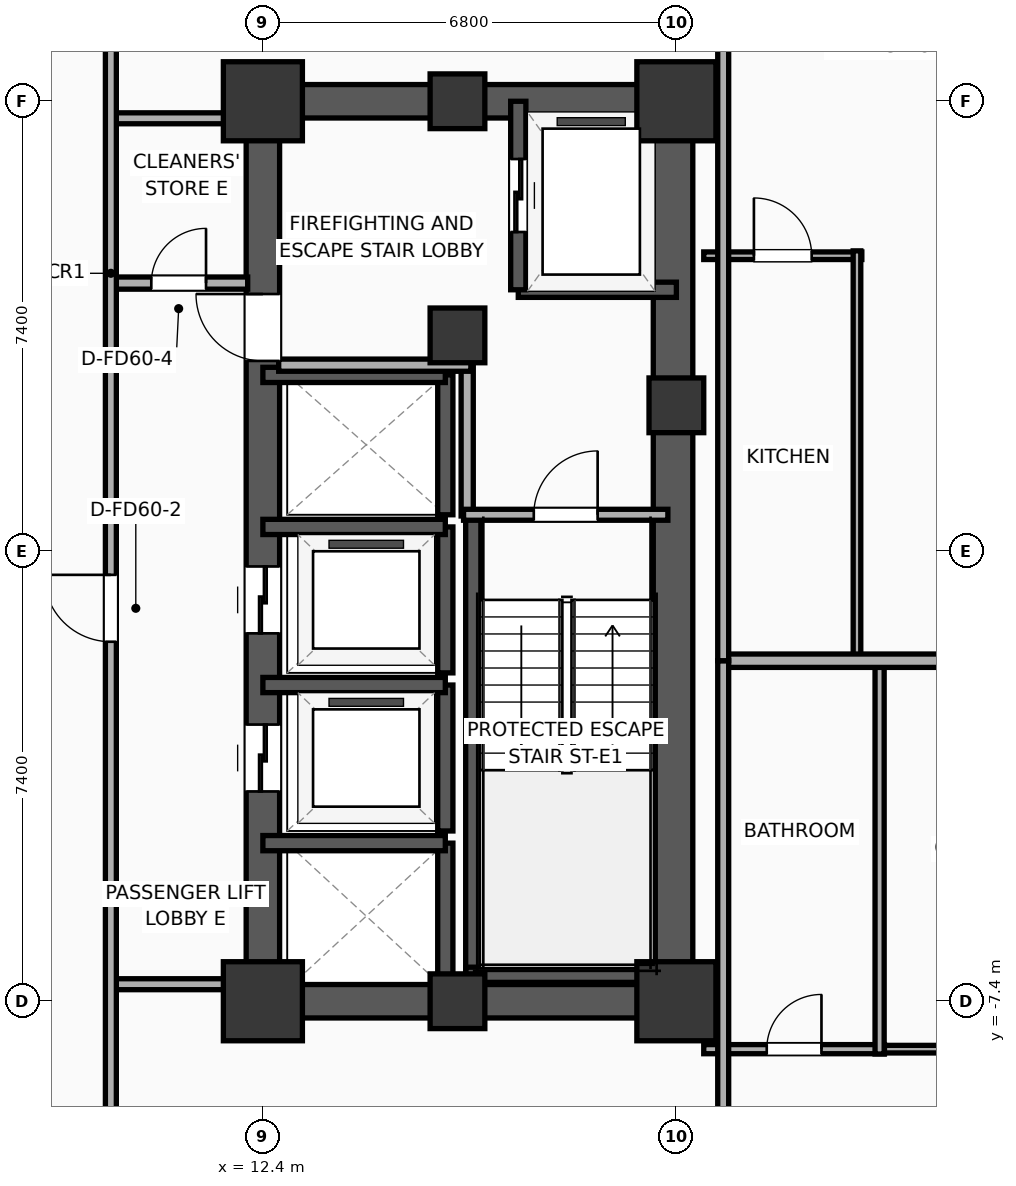
"""IFC4 building model, lengths in metres.
Left out: names, types, materials, properties, quantities, classifications, styles, units other than length and angle.
Written with IfcOpenShell. Run it as: python <this file> out.ifc"""

import sys

from ifc_helpers import new_model, si_unit, direction, frame, frame_2d, origin, origin_2d, place, context, subcontext, project, spatial, rectangle, extrude, element, fill, save


model = new_model("IFC4")
c1 = context("Model", 3, precision=1e-05, world=origin(), true_north=direction((0.0, 1.0)))
c2 = subcontext(c1, "Body", "Model", "MODEL_VIEW")
j1 = project(units=[si_unit("LENGTHUNIT", "METRE"), si_unit("PLANEANGLEUNIT", "RADIAN")], contexts=[c1])
p1 = place(None, origin())
s1 = spatial("IfcSite", under=j1, at=p1, CompositionType="ELEMENT")
p2 = place(p1, origin())
s2 = spatial("IfcBuilding", under=s1, at=p2, CompositionType="ELEMENT")
p3 = place(p2, frame((0.0, 0.0, 140.4)))
s3 = spatial("IfcBuildingStorey", under=s2, at=p3, CompositionType="ELEMENT", Elevation=140.4)
p4 = place(p3, frame((12.4, -7.4, 0.0), z_axis=(0.0, 0.0, 1.0), x_axis=(1.0, 0.0, 0.0)))
e1 = element("IfcColumn", 1, at=p4, inside=s3, PredefinedType="COLUMN", context=c2, shape_type="SweptSolid", body=[
    extrude(rectangle(XDim=1.3, YDim=1.3, at=origin_2d()), origin(), (0.0, 0.0, 1.0), 3.9),
])
p5 = place(p3, frame((15.6, 3.55, 0.0), z_axis=(0.0, 0.0, 1.0), x_axis=(1.0, 0.0, 0.0)))
e2 = element("IfcColumn", 2, at=p5, inside=s3, PredefinedType="COLUMN", context=c2, shape_type="SweptSolid", body=[
    extrude(rectangle(XDim=0.9, YDim=0.9, at=origin_2d()), origin(), (0.0, 0.0, 1.0), 3.9),
])
p6 = place(p3, frame((12.4, 7.4, 0.0), z_axis=(0.0, 0.0, 1.0), x_axis=(1.0, 0.0, 0.0)))
e3 = element("IfcColumn", 3, at=p6, inside=s3, PredefinedType="COLUMN", context=c2, shape_type="SweptSolid", body=[
    extrude(rectangle(XDim=1.3, YDim=1.3, at=origin_2d()), origin(), (0.0, 0.0, 1.0), 3.9),
])
for number, where, z_axis, x_axis in (
    (4, (15.6, -7.4, 0.0), (0.0, 0.0, 1.0), (1.0, 0.0, 0.0)),
    (5, (15.6, 7.4, 0.0), (0.0, 0.0, 1.0), (1.0, 0.0, 0.0)),
):
    element("IfcColumn", number, at=place(p3, frame(where, z_axis=z_axis, x_axis=x_axis)), inside=s3, PredefinedType="COLUMN", context=c2, shape_type="SweptSolid", body=[
        extrude(rectangle(XDim=0.9, YDim=0.9, at=origin_2d()), origin(), (0.0, 0.0, 1.0), 3.9),
    ])
p7 = place(p3, frame((19.2, -7.4, 0.0), z_axis=(0.0, 0.0, 1.0), x_axis=(1.0, 0.0, 0.0)))
e6 = element("IfcColumn", 6, at=p7, inside=s3, PredefinedType="COLUMN", context=c2, shape_type="SweptSolid", body=[
    extrude(rectangle(XDim=1.3, YDim=1.3, at=origin_2d()), origin(), (0.0, 0.0, 1.0), 3.9),
])
p8 = place(p3, frame((19.2, 2.4, 0.0), z_axis=(0.0, 0.0, 1.0), x_axis=(1.0, 0.0, 0.0)))
e7 = element("IfcColumn", 7, at=p8, inside=s3, PredefinedType="COLUMN", context=c2, shape_type="SweptSolid", body=[
    extrude(rectangle(XDim=0.9, YDim=0.9, at=origin_2d()), origin(), (0.0, 0.0, 1.0), 3.9),
])
p9 = place(p3, frame((19.2, 7.4, 0.0), z_axis=(0.0, 0.0, 1.0), x_axis=(1.0, 0.0, 0.0)))
e8 = element("IfcColumn", 8, at=p9, inside=s3, PredefinedType="COLUMN", context=c2, shape_type="SweptSolid", body=[
    extrude(rectangle(XDim=1.3, YDim=1.3, at=origin_2d()), origin(), (0.0, 0.0, 1.0), 3.9),
])
for number, where, z_axis, x_axis in (
    (9, (12.125, -7.4, 0.0), (0.0, 0.0, 1.0), (1.0, 0.0, 0.0)),
    (10, (12.125, 7.4, 0.0), (0.0, 0.0, 1.0), (1.0, 0.0, 0.0)),
):
    element("IfcWall", number, at=place(p3, frame(where, z_axis=z_axis, x_axis=x_axis)), inside=s3, PredefinedType="SHEAR", context=c2, shape_type="SweptSolid", body=[
        extrude(rectangle(XDim=7.35, YDim=0.55, at=frame_2d((3.675, 0.0))), origin(), (0.0, 0.0, 1.0), 3.65),
    ])
p10 = place(p3, frame((12.4, -7.4, 0.0), z_axis=(0.0, 0.0, 1.0), x_axis=(0.0, 1.0, 0.0)))
e11 = element("IfcWall", 11, at=p10, inside=s3, PredefinedType="SHEAR", context=c2, shape_type="SweptSolid", body=[
    extrude(rectangle(XDim=14.8, YDim=0.55, at=frame_2d((7.4, 0.0))), origin(), (0.0, 0.0, 1.0), 3.65),
])
p11 = place(p10, frame((3.45, 0.0, 0.0)))
e12 = element("IfcOpeningElement", 12, at=p11, cuts=e11, PredefinedType="OPENING", context=c2, shape_type="SweptSolid", body=[
    extrude(rectangle(XDim=1.1, YDim=2.05, at=frame_2d((0.55, 1.025))), frame((0.0, 0.285, 0.0), z_axis=(0.0, -1.0, 0.0), x_axis=(1.0, 0.0, 0.0)), (0.0, 0.0, 1.0), 0.57),
])
p12 = place(p10, frame((6.05, 0.0, 0.0)))
e13 = element("IfcOpeningElement", 13, at=p12, cuts=e11, PredefinedType="OPENING", context=c2, shape_type="SweptSolid", body=[
    extrude(rectangle(XDim=1.1, YDim=2.05, at=frame_2d((0.55, 1.025))), frame((0.0, 0.285, 0.0), z_axis=(0.0, -1.0, 0.0), x_axis=(1.0, 0.0, 0.0)), (0.0, 0.0, 1.0), 0.57),
])
p13 = place(p10, frame((10.53, 0.0, 0.0)))
e14 = element("IfcOpeningElement", 14, at=p13, cuts=e11, PredefinedType="OPENING", context=c2, shape_type="SweptSolid", body=[
    extrude(rectangle(XDim=1.1, YDim=2.05, at=frame_2d((0.55, 1.025))), frame((0.0, 0.285, 0.0), z_axis=(0.0, -1.0, 0.0), x_axis=(1.0, 0.0, 0.0)), (0.0, 0.0, 1.0), 0.57),
])
p14 = place(p3, frame((19.145, -7.4, 0.0), z_axis=(0.0, 0.0, 1.0), x_axis=(0.0, 1.0, 0.0)))
e15 = element("IfcWall", 15, at=p14, inside=s3, PredefinedType="SHEAR", context=c2, shape_type="SweptSolid", body=[
    extrude(rectangle(XDim=14.8, YDim=0.65, at=frame_2d((7.4, 0.0))), origin(), (0.0, 0.0, 1.0), 3.65),
])
p15 = place(p3, frame((15.86, -7.085, 0.0), z_axis=(0.0, 0.0, 1.0), x_axis=(0.0, 1.0, 0.0)))
e16 = element("IfcWall", 16, at=p15, inside=s3, PredefinedType="SOLIDWALL", context=c2, shape_type="SweptSolid", body=[
    extrude(rectangle(XDim=7.685, YDim=0.25, at=frame_2d((3.843, 0.0))), origin(), (0.0, 0.0, 1.0), 3.65),
])
p16 = place(p3, frame((15.74, -6.965, 0.0), z_axis=(0.0, 0.0, 1.0), x_axis=(1.0, 0.0, 0.0)))
e17 = element("IfcWall", 17, at=p16, inside=s3, PredefinedType="SOLIDWALL", context=c2, shape_type="SweptSolid", body=[
    extrude(rectangle(XDim=3.46, YDim=0.25, at=frame_2d((1.73, 0.0))), origin(), (0.0, 0.0, 1.0), 3.65),
])
p17 = place(p3, frame((16.6, 4.3, 0.0), z_axis=(0.0, 0.0, 1.0), x_axis=(1.0, 0.0, 0.0)))
e18 = element("IfcWall", 18, at=p17, inside=s3, PredefinedType="SOLIDWALL", context=c2, shape_type="SweptSolid", body=[
    extrude(rectangle(XDim=2.6, YDim=0.25, at=frame_2d((1.3, 0.0))), origin(), (0.0, 0.0, 1.0), 3.65),
])
p18 = place(p3, frame((16.6, 7.4, 0.0), z_axis=(0.0, 0.0, 1.0), x_axis=(0.0, -1.0, 0.0)))
e19 = element("IfcWall", 19, at=p18, inside=s3, PredefinedType="SOLIDWALL", context=c2, shape_type="SweptSolid", body=[
    extrude(rectangle(XDim=3.1, YDim=0.25, at=frame_2d((1.55, 0.0))), origin(), (0.0, 0.0, 1.0), 3.65),
])
p19 = place(p18, frame((0.95, 0.0, 0.0)))
e20 = element("IfcOpeningElement", 20, at=p19, cuts=e19, PredefinedType="OPENING", context=c2, shape_type="SweptSolid", body=[
    extrude(rectangle(XDim=1.2, YDim=2.05, at=frame_2d((0.6, 1.025))), frame((0.0, 0.135, 0.0), z_axis=(0.0, -1.0, 0.0), x_axis=(1.0, 0.0, 0.0)), (0.0, 0.0, 1.0), 0.27),
])
p20 = place(p3, frame((15.4, -7.4, 0.0), z_axis=(0.0, 0.0, 1.0), x_axis=(0.0, 1.0, 0.0)))
e21 = element("IfcWall", 21, at=p20, inside=s3, PredefinedType="SOLIDWALL", context=c2, shape_type="SweptSolid", body=[
    extrude(rectangle(XDim=2.6, YDim=0.25, at=frame_2d((1.3, 0.0))), origin(), (0.0, 0.0, 1.0), 3.65),
])
p21 = place(p3, frame((15.4, -4.8, 0.0), z_axis=(0.0, 0.0, 1.0), x_axis=(-1.0, 0.0, 0.0)))
e22 = element("IfcWall", 22, at=p21, inside=s3, PredefinedType="SOLIDWALL", context=c2, shape_type="SweptSolid", body=[
    extrude(rectangle(XDim=3.0, YDim=0.25, at=frame_2d((1.5, 0.0))), origin(), (0.0, 0.0, 1.0), 3.65),
])
p22 = place(p3, frame((15.4, -4.6, 0.0), z_axis=(0.0, 0.0, 1.0), x_axis=(0.0, 1.0, 0.0)))
e23 = element("IfcWall", 23, at=p22, inside=s3, PredefinedType="SOLIDWALL", context=c2, shape_type="SweptSolid", body=[
    extrude(rectangle(XDim=2.4, YDim=0.25, at=frame_2d((1.2, 0.0))), origin(), (0.0, 0.0, 1.0), 3.65),
])
p23 = place(p3, frame((15.4, -2.2, 0.0), z_axis=(0.0, 0.0, 1.0), x_axis=(-1.0, 0.0, 0.0)))
e24 = element("IfcWall", 24, at=p23, inside=s3, PredefinedType="SOLIDWALL", context=c2, shape_type="SweptSolid", body=[
    extrude(rectangle(XDim=3.0, YDim=0.25, at=frame_2d((1.5, 0.0))), origin(), (0.0, 0.0, 1.0), 3.65),
])
p24 = place(p3, frame((15.4, -2.0, 0.0), z_axis=(0.0, 0.0, 1.0), x_axis=(0.0, 1.0, 0.0)))
e25 = element("IfcWall", 25, at=p24, inside=s3, PredefinedType="SOLIDWALL", context=c2, shape_type="SweptSolid", body=[
    extrude(rectangle(XDim=2.4, YDim=0.25, at=frame_2d((1.2, 0.0))), origin(), (0.0, 0.0, 1.0), 3.65),
])
p25 = place(p3, frame((15.4, 0.4, 0.0), z_axis=(0.0, 0.0, 1.0), x_axis=(-1.0, 0.0, 0.0)))
e26 = element("IfcWall", 26, at=p25, inside=s3, PredefinedType="SOLIDWALL", context=c2, shape_type="SweptSolid", body=[
    extrude(rectangle(XDim=3.0, YDim=0.25, at=frame_2d((1.5, 0.0))), origin(), (0.0, 0.0, 1.0), 3.65),
])
p26 = place(p3, frame((15.4, 0.6, 0.0), z_axis=(0.0, 0.0, 1.0), x_axis=(0.0, 1.0, 0.0)))
e27 = element("IfcWall", 27, at=p26, inside=s3, PredefinedType="SOLIDWALL", context=c2, shape_type="SweptSolid", body=[
    extrude(rectangle(XDim=2.3, YDim=0.25, at=frame_2d((1.15, 0.0))), origin(), (0.0, 0.0, 1.0), 3.65),
])
p27 = place(p3, frame((15.4, 2.9, 0.0), z_axis=(0.0, 0.0, 1.0), x_axis=(-1.0, 0.0, 0.0)))
e28 = element("IfcWall", 28, at=p27, inside=s3, PredefinedType="SOLIDWALL", context=c2, shape_type="SweptSolid", body=[
    extrude(rectangle(XDim=3.0, YDim=0.25, at=frame_2d((1.5, 0.0))), origin(), (0.0, 0.0, 1.0), 3.65),
])
p28 = place(p3, frame((15.76, 0.58, 0.0), z_axis=(0.0, 0.0, 1.0), x_axis=(0.0, 1.0, 0.0)))
e29 = element("IfcWall", 29, at=p28, inside=s3, PredefinedType="PARTITIONING", context=c2, shape_type="SweptSolid", body=[
    extrude(rectangle(XDim=2.52, YDim=0.2, at=frame_2d((1.26, 0.0))), origin(), (0.0, 0.0, 1.0), 3.65),
])
p29 = place(p3, frame((12.66, 3.06, 0.0), z_axis=(0.0, 0.0, 1.0), x_axis=(1.0, 0.0, 0.0)))
e30 = element("IfcWall", 30, at=p29, inside=s3, PredefinedType="PARTITIONING", context=c2, shape_type="SweptSolid", body=[
    extrude(rectangle(XDim=3.16, YDim=0.2, at=frame_2d((1.58, 0.0))), origin(), (0.0, 0.0, 1.0), 3.65),
])
p30 = place(p3, frame((15.7, 0.6, 0.0), z_axis=(0.0, 0.0, 1.0), x_axis=(1.0, 0.0, 0.0)))
e31 = element("IfcWall", 31, at=p30, inside=s3, PredefinedType="PARTITIONING", context=c2, shape_type="SweptSolid", body=[
    extrude(rectangle(XDim=3.36, YDim=0.18, at=frame_2d((1.68, 0.0))), origin(), (0.0, 0.0, 1.0), 3.65),
])
p31 = place(p30, frame((1.155, 0.0, 0.0)))
e32 = element("IfcOpeningElement", 32, at=p31, cuts=e31, PredefinedType="OPENING", context=c2, shape_type="SweptSolid", body=[
    extrude(rectangle(XDim=1.05, YDim=2.05, at=frame_2d((0.525, 1.025))), frame((0.0, 0.1, 0.0), z_axis=(0.0, -1.0, 0.0), x_axis=(1.0, 0.0, 0.0)), (0.0, 0.0, 1.0), 0.2),
])
p32 = place(p3, frame((9.88, 4.41, 0.0), z_axis=(0.0, 0.0, 1.0), x_axis=(1.0, 0.0, 0.0)))
e33 = element("IfcWall", 33, at=p32, inside=s3, PredefinedType="PARTITIONING", context=c2, shape_type="SweptSolid", body=[
    extrude(rectangle(XDim=2.27, YDim=0.2, at=frame_2d((1.135, 0.0))), origin(), (0.0, 0.0, 1.0), 3.65),
])
p33 = place(p32, frame((0.685, 0.0, 0.0)))
e34 = element("IfcOpeningElement", 34, at=p33, cuts=e33, PredefinedType="OPENING", context=c2, shape_type="SweptSolid", body=[
    extrude(rectangle(XDim=0.9, YDim=2.05, at=frame_2d((0.45, 1.025))), frame((0.0, 0.11, 0.0), z_axis=(0.0, -1.0, 0.0), x_axis=(1.0, 0.0, 0.0)), (0.0, 0.0, 1.0), 0.22),
])
for number, where, z_axis, x_axis in (
    (35, (9.88, 7.12, 0.0), (0.0, 0.0, 1.0), (1.0, 0.0, 0.0)),
    (36, (9.88, -7.12, 0.0), (0.0, 0.0, 1.0), (1.0, 0.0, 0.0)),
):
    element("IfcWall", number, at=place(p3, frame(where, z_axis=z_axis, x_axis=x_axis)), inside=s3, PredefinedType="PARTITIONING", context=c2, shape_type="SweptSolid", body=[
        extrude(rectangle(XDim=2.27, YDim=0.18, at=frame_2d((1.135, 0.0))), origin(), (0.0, 0.0, 1.0), 3.65),
    ])
p34 = place(p3, frame((9.9, -9.38, 0.0), z_axis=(0.0, 0.0, 1.0), x_axis=(0.0, 1.0, 0.0)))
e37 = element("IfcWall", 37, at=p34, inside=s3, PredefinedType="PARTITIONING", context=c2, shape_type="SweptSolid", body=[
    extrude(rectangle(XDim=18.76, YDim=0.18, at=frame_2d((9.38, 0.0))), origin(), (0.0, 0.0, 1.0), 3.65),
])
p35 = place(p34, frame((7.892, 0.0, 0.0)))
e38 = element("IfcOpeningElement", 38, at=p35, cuts=e37, PredefinedType="OPENING", context=c2, shape_type="SweptSolid", body=[
    extrude(rectangle(XDim=1.1, YDim=2.05, at=frame_2d((0.55, 1.025))), frame((0.0, 0.1, 0.0), z_axis=(0.0, -1.0, 0.0), x_axis=(1.0, 0.0, 0.0)), (0.0, 0.0, 1.0), 0.2),
])
p36 = place(p3, frame((22.482, -8.188, 0.0), z_axis=(0.0, 0.0, 1.0), x_axis=(1.0, 0.0, 0.0)))
e39 = element("IfcWall", 39, at=p36, inside=s3, PredefinedType="PARTITIONING", context=c2, shape_type="SweptSolid", body=[
    extrude(rectangle(XDim=5.06, YDim=0.125, at=frame_2d((2.53, 0.0))), origin(), (0.0, 0.0, 1.0), 3.65),
])
p37 = place(p36, frame((1.827, 0.0, 0.0)))
e40 = element("IfcOpeningElement", 40, at=p37, cuts=e39, PredefinedType="OPENING", context=c2, shape_type="SweptSolid", body=[
    extrude(rectangle(XDim=0.9, YDim=2.05, at=frame_2d((0.45, 1.025))), frame((0.0, 0.073, 0.0), z_axis=(0.0, -1.0, 0.0), x_axis=(1.0, 0.0, 0.0)), (0.0, 0.0, 1.0), 0.145),
])
p38 = place(p3, frame((19.65, -8.188, 0.0), z_axis=(0.0, 0.0, 1.0), x_axis=(1.0, 0.0, 0.0)))
e41 = element("IfcWall", 41, at=p38, inside=s3, PredefinedType="PLUMBINGWALL", context=c2, shape_type="SweptSolid", body=[
    extrude(rectangle(XDim=2.972, YDim=0.15, at=frame_2d((1.486, 0.0))), origin(), (0.0, 0.0, 1.0), 3.65),
])
p39 = place(p38, frame((1.036, 0.0, 0.0)))
e42 = element("IfcOpeningElement", 42, at=p39, cuts=e41, PredefinedType="OPENING", context=c2, shape_type="SweptSolid", body=[
    extrude(rectangle(XDim=0.9, YDim=2.05, at=frame_2d((0.45, 1.025))), frame((0.0, 0.085, 0.0), z_axis=(0.0, -1.0, 0.0), x_axis=(1.0, 0.0, 0.0)), (0.0, 0.0, 1.0), 0.17),
])
p40 = place(p3, frame((22.542, -8.268, 0.0), z_axis=(0.0, 0.0, 1.0), x_axis=(0.0, 1.0, 0.0)))
e43 = element("IfcWall", 43, at=p40, inside=s3, PredefinedType="PLUMBINGWALL", context=c2, shape_type="SweptSolid", body=[
    extrude(rectangle(XDim=6.448, YDim=0.15, at=frame_2d((3.224, 0.0))), origin(), (0.0, 0.0, 1.0), 3.65),
])
p41 = place(p3, frame((19.65, 4.86, 0.0), z_axis=(0.0, 0.0, 1.0), x_axis=(1.0, 0.0, 0.0)))
e44 = element("IfcWall", 44, at=p41, inside=s3, PredefinedType="PARTITIONING", context=c2, shape_type="SweptSolid", body=[
    extrude(rectangle(XDim=2.6, YDim=0.125, at=frame_2d((1.3, 0.0))), origin(), (0.0, 0.0, 1.0), 3.65),
])
p42 = place(p41, frame((0.825, 0.0, 0.0)))
e45 = element("IfcOpeningElement", 45, at=p42, cuts=e44, PredefinedType="OPENING", context=c2, shape_type="SweptSolid", body=[
    extrude(rectangle(XDim=0.95, YDim=2.05, at=frame_2d((0.475, 1.025))), frame((0.0, 0.073, 0.0), z_axis=(0.0, -1.0, 0.0), x_axis=(1.0, 0.0, 0.0)), (0.0, 0.0, 1.0), 0.145),
])
p43 = place(p3, frame((22.17, -1.78, 0.0), z_axis=(0.0, 0.0, 1.0), x_axis=(0.0, 1.0, 0.0)))
e46 = element("IfcWall", 46, at=p43, inside=s3, PredefinedType="PARTITIONING", context=c2, shape_type="SweptSolid", body=[
    extrude(rectangle(XDim=6.72, YDim=0.125, at=frame_2d((3.36, 0.0))), origin(), (0.0, 0.0, 1.0), 3.65),
])
p44 = place(p3, frame((19.97, -1.8, 0.0), z_axis=(0.0, 0.0, 1.0), x_axis=(1.0, 0.0, 0.0)))
e47 = element("IfcWall", 47, at=p44, inside=s3, PredefinedType="PARTITIONING", context=c2, shape_type="SweptSolid", body=[
    extrude(rectangle(XDim=6.749, YDim=0.22, at=frame_2d((3.375, 0.0))), origin(), (0.0, 0.0, 1.0), 3.65),
])
p45 = place(p3, frame((19.97, -18.506, 0.0), z_axis=(0.0, 0.0, 1.0), x_axis=(0.0, 1.0, 0.0)))
e48 = element("IfcWall", 48, at=p45, inside=s3, PredefinedType="PARTITIONING", context=c2, shape_type="SweptSolid", body=[
    extrude(rectangle(XDim=16.706, YDim=0.18, at=frame_2d((8.353, 0.0))), origin(), (0.0, 0.0, 1.0), 3.65),
])
p46 = place(p45, frame((8.027, 0.0, 0.0)))
e49 = element("IfcOpeningElement", 49, at=p46, cuts=e48, PredefinedType="OPENING", context=c2, shape_type="SweptSolid", body=[
    extrude(rectangle(XDim=0.9, YDim=2.05, at=frame_2d((0.45, 1.025))), frame((0.0, 0.1, 0.0), z_axis=(0.0, -1.0, 0.0), x_axis=(1.0, 0.0, 0.0)), (0.0, 0.0, 1.0), 0.2),
])
p47 = place(p3, frame((19.97, -1.8, 0.0), z_axis=(0.0, 0.0, 1.0), x_axis=(0.0, 1.0, 0.0)))
e50 = element("IfcWall", 50, at=p47, inside=s3, PredefinedType="PARTITIONING", context=c2, shape_type="SweptSolid", body=[
    extrude(rectangle(XDim=23.977, YDim=0.18, at=frame_2d((11.988, 0.0))), origin(), (0.0, 0.0, 1.0), 2.54),
])
p48 = place(p47, frame((11.38, 0.0, 0.0)))
e51 = element("IfcOpeningElement", 51, at=p48, cuts=e50, PredefinedType="OPENING", context=c2, shape_type="SweptSolid", body=[
    extrude(rectangle(XDim=0.9, YDim=2.05, at=frame_2d((0.45, 1.025))), frame((0.0, 0.1, 0.0), z_axis=(0.0, -1.0, 0.0), x_axis=(1.0, 0.0, 0.0)), (0.0, 0.0, 1.0), 0.2),
])
p49 = place(p19, origin())
e52 = element("IfcDoor", 52, at=p49, inside=s3, OperationType="SLIDING_TO_LEFT", PredefinedType="DOOR", context=c2, shape_type="SweptSolid", body=[
    extrude(rectangle(XDim=1.2, YDim=2.05, at=frame_2d((0.6, 1.025))), frame((0.0, 0.025, 0.0), z_axis=(0.0, -1.0, 0.0), x_axis=(1.0, 0.0, 0.0)), (0.0, 0.0, 1.0), 0.05),
])
fill(e20, e52)
p50 = place(p11, origin())
e53 = element("IfcDoor", 53, at=p50, inside=s3, OperationType="SLIDING_TO_LEFT", PredefinedType="DOOR", context=c2, shape_type="SweptSolid", body=[
    extrude(rectangle(XDim=1.1, YDim=2.05, at=frame_2d((0.55, 1.025))), frame((0.0, 0.025, 0.0), z_axis=(0.0, -1.0, 0.0), x_axis=(1.0, 0.0, 0.0)), (0.0, 0.0, 1.0), 0.05),
])
fill(e12, e53)
p51 = place(p12, origin())
e54 = element("IfcDoor", 54, at=p51, inside=s3, OperationType="SLIDING_TO_LEFT", PredefinedType="DOOR", context=c2, shape_type="SweptSolid", body=[
    extrude(rectangle(XDim=1.1, YDim=2.05, at=frame_2d((0.55, 1.025))), frame((0.0, 0.025, 0.0), z_axis=(0.0, -1.0, 0.0), x_axis=(1.0, 0.0, 0.0)), (0.0, 0.0, 1.0), 0.05),
])
fill(e13, e54)
p52 = place(p31, origin())
e55 = element("IfcDoor", 55, at=p52, inside=s3, OperationType="SINGLE_SWING_RIGHT", PredefinedType="DOOR", context=c2, shape_type="SweptSolid", body=[
    extrude(rectangle(XDim=1.05, YDim=2.05, at=frame_2d((0.525, 1.025))), frame((0.0, 0.025, 0.0), z_axis=(0.0, -1.0, 0.0), x_axis=(1.0, 0.0, 0.0)), (0.0, 0.0, 1.0), 0.05),
])
fill(e32, e55)
p53 = place(p33, origin())
e56 = element("IfcDoor", 56, at=p53, inside=s3, OperationType="SINGLE_SWING_RIGHT", PredefinedType="DOOR", context=c2, shape_type="SweptSolid", body=[
    extrude(rectangle(XDim=0.9, YDim=2.05, at=frame_2d((0.45, 1.025))), frame((0.0, 0.025, 0.0), z_axis=(0.0, -1.0, 0.0), x_axis=(1.0, 0.0, 0.0)), (0.0, 0.0, 1.0), 0.05),
])
fill(e34, e56)
p54 = place(p35, origin())
e57 = element("IfcDoor", 57, at=p54, inside=s3, OperationType="SINGLE_SWING_RIGHT", PredefinedType="DOOR", context=c2, shape_type="SweptSolid", body=[
    extrude(rectangle(XDim=1.1, YDim=2.05, at=frame_2d((0.55, 1.025))), frame((0.0, 0.025, 0.0), z_axis=(0.0, -1.0, 0.0), x_axis=(1.0, 0.0, 0.0)), (0.0, 0.0, 1.0), 0.05),
])
fill(e38, e57)
p55 = place(p39, origin())
e58 = element("IfcDoor", 58, at=p55, inside=s3, OperationType="SINGLE_SWING_RIGHT", PredefinedType="DOOR", context=c2, shape_type="SweptSolid", body=[
    extrude(rectangle(XDim=0.9, YDim=2.05, at=frame_2d((0.45, 1.025))), frame((0.0, 0.025, 0.0), z_axis=(0.0, -1.0, 0.0), x_axis=(1.0, 0.0, 0.0)), (0.0, 0.0, 1.0), 0.05),
])
fill(e42, e58)
p56 = place(p42, origin())
e59 = element("IfcDoor", 59, at=p56, inside=s3, OperationType="SINGLE_SWING_LEFT", PredefinedType="DOOR", context=c2, shape_type="SweptSolid", body=[
    extrude(rectangle(XDim=0.95, YDim=2.05, at=frame_2d((0.475, 1.025))), frame((0.0, 0.025, 0.0), z_axis=(0.0, -1.0, 0.0), x_axis=(1.0, 0.0, 0.0)), (0.0, 0.0, 1.0), 0.05),
])
fill(e45, e59)
p57 = place(p13, origin())
e60 = element("IfcDoor", 60, at=p57, inside=s3, OperationType="SINGLE_SWING_RIGHT", PredefinedType="DOOR", context=c2, shape_type="SweptSolid", body=[
    extrude(rectangle(XDim=1.1, YDim=2.05, at=frame_2d((0.55, 1.025))), frame((0.0, 0.025, 0.0), z_axis=(0.0, -1.0, 0.0), x_axis=(1.0, 0.0, 0.0)), (0.0, 0.0, 1.0), 0.05),
])
fill(e14, e60)
save(model, sys.argv[1])
